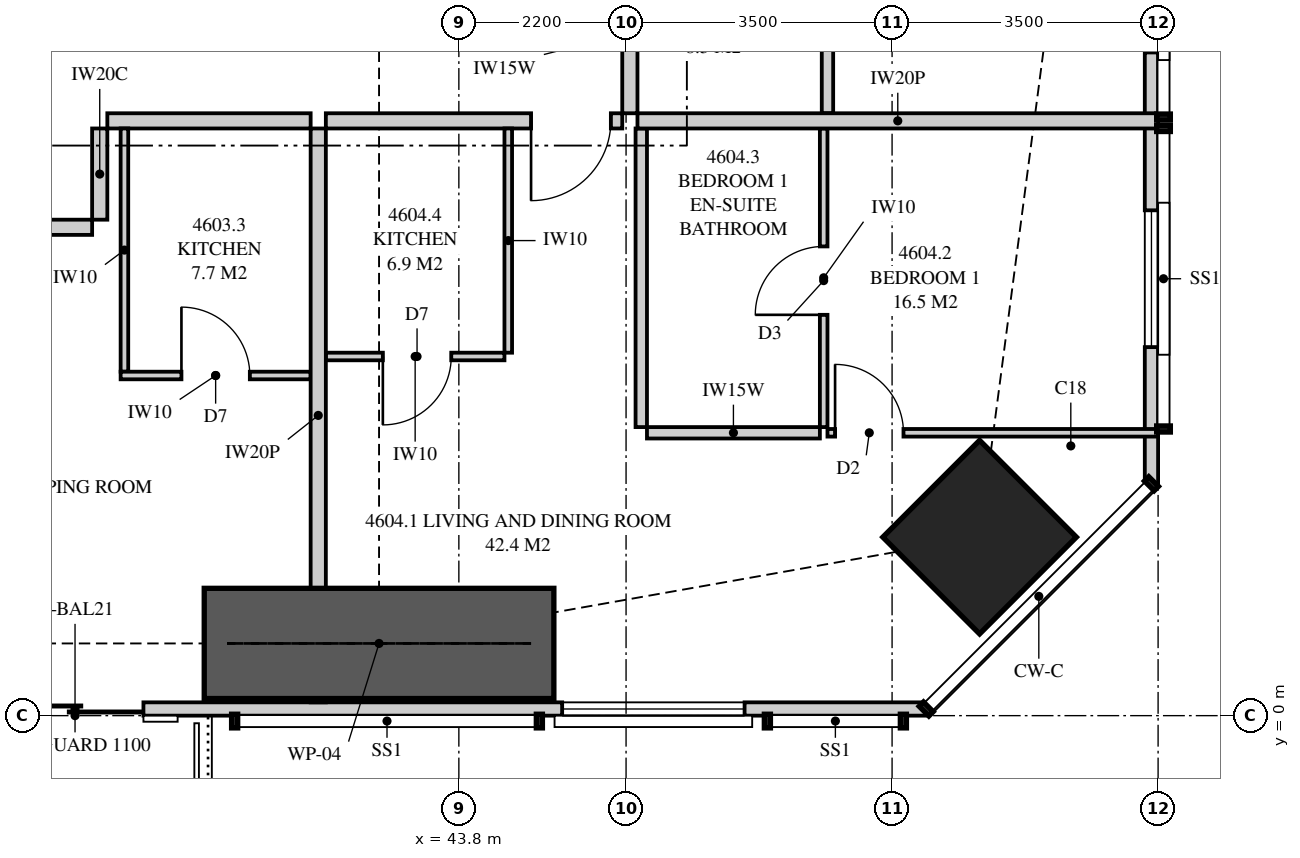
"""IFC4 building model, lengths in metres.
Left out: names, types, materials, properties, quantities, classifications, styles, units other than length and angle.
Written with IfcOpenShell. Run it as: python <this file> out.ifc"""

import sys

from ifc_helpers import new_model, si_unit, direction, frame, frame_2d, origin, origin_2d, place, context, subcontext, project, spatial, polyline, rectangle, outline, extrude, element, fill, save


model = new_model("IFC4")
c1 = context("Model", 3, precision=1e-05, world=origin(), true_north=direction((0.0, 1.0)))
c2 = subcontext(c1, "Body", "Model", "MODEL_VIEW")
j1 = project(units=[si_unit("LENGTHUNIT", "METRE"), si_unit("PLANEANGLEUNIT", "RADIAN")], contexts=[c1])
p1 = place(None, origin())
s1 = spatial("IfcSite", under=j1, at=p1, CompositionType="ELEMENT")
p2 = place(p1, origin())
s2 = spatial("IfcBuilding", under=s1, at=p2, CompositionType="ELEMENT")
p3 = place(p2, frame((0.0, 0.0, 171.1)))
s3 = spatial("IfcBuildingStorey", under=s2, at=p3, CompositionType="ELEMENT", Elevation=171.1)
p4 = place(p3, frame((50.652, 2.348, 0.0), z_axis=(0.0, 0.0, 1.0), x_axis=(0.707106781187, 0.707106781187, 0.0)))
e1 = element("IfcColumn", 1, at=p4, inside=s3, PredefinedType="COLUMN", context=c2, shape_type="SweptSolid", body=[
    extrude(rectangle(XDim=1.8, YDim=1.8, at=origin_2d()), origin(), (0.0, 0.0, 1.0), 3.35),
])
p5 = place(p3, frame((15.051, 0.087, 0.0), z_axis=(0.0, 0.0, 1.0), x_axis=(1.0, 0.0, 0.0)))
e2 = element("IfcWall", 2, at=p5, inside=s3, PredefinedType="SOLIDWALL", context=c2, shape_type="SweptSolid", body=[
    extrude(outline(polyline([(0.0, 0.0), (34.897, 0.0), (34.897, 3.11), (27.91, 3.11), (27.91, 2.15), (27.836, 2.15), (27.836, 3.11), (27.699, 3.11), (27.699, 2.15), (7.199, 2.15), (7.199, 3.11), (7.062, 3.11), (7.062, 2.15), (6.987, 2.15), (6.987, 3.11), (0.0, 3.11), (0.0, 0.0)])), frame((0.0, 0.087, 0.0), z_axis=(0.0, -1.0, 0.0), x_axis=(1.0, 0.0, 0.0)), (0.0, 0.0, 1.0), 0.175),
])
p6 = place(p5, frame((1.824, 0.0, 0.4)))
e3 = element("IfcOpeningElement", 3, at=p6, cuts=e2, PredefinedType="OPENING", context=c2, shape_type="SweptSolid", body=[
    extrude(rectangle(XDim=2.4, YDim=1.7, at=frame_2d((1.2, 0.85))), frame((0.0, 0.097, 0.0), z_axis=(0.0, -1.0, 0.0), x_axis=(1.0, 0.0, 0.0)), (0.0, 0.0, 1.0), 0.195),
])
p7 = place(p5, frame((10.399, 0.0, 0.0)))
e4 = element("IfcOpeningElement", 4, at=p7, cuts=e2, PredefinedType="OPENING", context=c2, shape_type="SweptSolid", body=[
    extrude(rectangle(XDim=1.8, YDim=2.1, at=frame_2d((0.9, 1.05))), frame((0.0, 0.097, 0.0), z_axis=(0.0, -1.0, 0.0), x_axis=(1.0, 0.0, 0.0)), (0.0, 0.0, 1.0), 0.195),
])
p8 = place(p5, frame((13.827, 0.0, 0.4)))
e5 = element("IfcOpeningElement", 5, at=p8, cuts=e2, PredefinedType="OPENING", context=c2, shape_type="SweptSolid", body=[
    extrude(rectangle(XDim=1.2, YDim=1.7, at=frame_2d((0.6, 0.85))), frame((0.0, 0.097, 0.0), z_axis=(0.0, -1.0, 0.0), x_axis=(1.0, 0.0, 0.0)), (0.0, 0.0, 1.0), 0.195),
])
p9 = place(p5, frame((22.799, 0.0, 0.0)))
e6 = element("IfcOpeningElement", 6, at=p9, cuts=e2, PredefinedType="OPENING", context=c2, shape_type="SweptSolid", body=[
    extrude(rectangle(XDim=1.8, YDim=2.1, at=frame_2d((0.9, 1.05))), frame((0.0, 0.097, 0.0), z_axis=(0.0, -1.0, 0.0), x_axis=(1.0, 0.0, 0.0)), (0.0, 0.0, 1.0), 0.195),
])
p10 = place(p5, frame((19.849, 0.0, 0.4)))
e7 = element("IfcOpeningElement", 7, at=p10, cuts=e2, PredefinedType="OPENING", context=c2, shape_type="SweptSolid", body=[
    extrude(rectangle(XDim=2.4, YDim=1.7, at=frame_2d((1.2, 0.85))), frame((0.0, 0.097, 0.0), z_axis=(0.0, -1.0, 0.0), x_axis=(1.0, 0.0, 0.0)), (0.0, 0.0, 1.0), 0.195),
])
p11 = place(p5, frame((30.108, 0.0, 0.4)))
e8 = element("IfcOpeningElement", 8, at=p11, cuts=e2, PredefinedType="OPENING", context=c2, shape_type="SweptSolid", body=[
    extrude(rectangle(XDim=2.4, YDim=1.7, at=frame_2d((1.2, 0.85))), frame((0.0, 0.097, 0.0), z_axis=(0.0, -1.0, 0.0), x_axis=(1.0, 0.0, 0.0)), (0.0, 0.0, 1.0), 0.195),
])
p12 = place(p3, frame((52.913, 3.051, 0.0), z_axis=(0.0, 0.0, 1.0), x_axis=(0.0, 1.0, 0.0)))
e9 = element("IfcWall", 9, at=p12, inside=s3, PredefinedType="SOLIDWALL", context=c2, shape_type="SweptSolid", body=[
    extrude(outline(polyline([(0.0, 0.0), (29.897, 0.0), (29.897, 3.11), (22.167, 3.11), (22.167, 2.15), (22.074, 2.15), (22.074, 3.11), (21.949, 3.11), (21.949, 2.15), (9.949, 2.15), (9.949, 3.11), (9.847, 3.11), (9.847, 2.15), (9.706, 2.15), (9.706, 3.11), (0.0, 3.11), (0.0, 0.0)])), frame((0.0, 0.087, 0.0), z_axis=(0.0, -1.0, 0.0), x_axis=(1.0, 0.0, 0.0)), (0.0, 0.0, 1.0), 0.175),
])
p13 = place(p12, frame((1.797, 0.0, 0.4)))
e10 = element("IfcOpeningElement", 10, at=p13, cuts=e9, PredefinedType="OPENING", context=c2, shape_type="SweptSolid", body=[
    extrude(rectangle(XDim=1.8, YDim=1.7, at=frame_2d((0.9, 0.85))), frame((0.0, 0.097, 0.0), z_axis=(0.0, -1.0, 0.0), x_axis=(1.0, 0.0, 0.0)), (0.0, 0.0, 1.0), 0.195),
])
p14 = place(p12, frame((5.674, 0.0, 0.4)))
e11 = element("IfcOpeningElement", 11, at=p14, cuts=e9, PredefinedType="OPENING", context=c2, shape_type="SweptSolid", body=[
    extrude(rectangle(XDim=1.8, YDim=1.7, at=frame_2d((0.9, 0.85))), frame((0.0, 0.097, 0.0), z_axis=(0.0, -1.0, 0.0), x_axis=(1.0, 0.0, 0.0)), (0.0, 0.0, 1.0), 0.195),
])
p15 = place(p12, frame((12.349, 0.0, 0.4)))
e12 = element("IfcOpeningElement", 12, at=p15, cuts=e9, PredefinedType="OPENING", context=c2, shape_type="SweptSolid", body=[
    extrude(rectangle(XDim=2.4, YDim=1.7, at=frame_2d((1.2, 0.85))), frame((0.0, 0.097, 0.0), z_axis=(0.0, -1.0, 0.0), x_axis=(1.0, 0.0, 0.0)), (0.0, 0.0, 1.0), 0.195),
])
p16 = place(p12, frame((15.274, 0.0, 0.0)))
e13 = element("IfcOpeningElement", 13, at=p16, cuts=e9, PredefinedType="OPENING", context=c2, shape_type="SweptSolid", body=[
    extrude(rectangle(XDim=1.8, YDim=2.1, at=frame_2d((0.9, 1.05))), frame((0.0, 0.097, 0.0), z_axis=(0.0, -1.0, 0.0), x_axis=(1.0, 0.0, 0.0)), (0.0, 0.0, 1.0), 0.195),
])
p17 = place(p12, frame((24.373, 0.0, 0.4)))
e14 = element("IfcOpeningElement", 14, at=p17, cuts=e9, PredefinedType="OPENING", context=c2, shape_type="SweptSolid", body=[
    extrude(rectangle(XDim=1.2, YDim=1.7, at=frame_2d((0.6, 0.85))), frame((0.0, 0.097, 0.0), z_axis=(0.0, -1.0, 0.0), x_axis=(1.0, 0.0, 0.0)), (0.0, 0.0, 1.0), 0.195),
])
p18 = place(p12, frame((26.801, 0.0, 0.4)))
e15 = element("IfcOpeningElement", 15, at=p18, cuts=e9, PredefinedType="OPENING", context=c2, shape_type="SweptSolid", body=[
    extrude(rectangle(XDim=1.8, YDim=1.7, at=frame_2d((0.9, 0.85))), frame((0.0, 0.097, 0.0), z_axis=(0.0, -1.0, 0.0), x_axis=(1.0, 0.0, 0.0)), (0.0, 0.0, 1.0), 0.195),
])
p19 = place(p3, frame((41.95, 0.175, 0.0), z_axis=(0.0, 0.0, 1.0), x_axis=(0.0, 1.0, 0.0)))
e16 = element("IfcWall", 16, at=p19, inside=s3, PredefinedType="PARTITIONING", context=c2, shape_type="SweptSolid", body=[
    extrude(outline(polyline([(0.529, 2.15), (0.0, 2.15), (0.0, 0.0), (0.529, 0.0), (0.529, 0.876), (1.021, 0.876), (1.021, 0.0), (7.55, 0.0), (7.55, 3.11), (1.685, 3.11), (1.685, 2.15), (1.021, 2.15), (1.021, 1.273), (0.529, 1.273), (0.529, 2.15)])), frame((0.0, 0.1, 0.0), z_axis=(0.0, -1.0, 0.0), x_axis=(1.0, 0.0, 0.0)), (0.0, 0.0, 1.0), 0.2),
])
p20 = place(p3, frame((42.05, 7.825, 0.0), z_axis=(0.0, 0.0, 1.0), x_axis=(1.0, 0.0, 0.0)))
e17 = element("IfcWall", 17, at=p20, inside=s3, PredefinedType="PARTITIONING", context=c2, shape_type="SweptSolid", body=[
    extrude(outline(polyline([(0.0, 0.0), (3.9, 0.0), (3.9, 3.11), (1.037, 3.11), (1.037, 2.541), (0.363, 2.541), (0.363, 3.11), (0.0, 3.11), (0.0, 0.0)])), frame((0.0, 0.1, 0.0), z_axis=(0.0, -1.0, 0.0), x_axis=(1.0, 0.0, 0.0)), (0.0, 0.0, 1.0), 0.2),
])
p21 = place(p20, frame((2.7, 0.0, 0.0)))
e18 = element("IfcOpeningElement", 18, at=p21, cuts=e17, PredefinedType="OPENING", context=c2, shape_type="SweptSolid", body=[
    extrude(rectangle(XDim=1.05, YDim=2.2, at=frame_2d((0.525, 1.1))), frame((0.0, 0.11, 0.0), z_axis=(0.0, -1.0, 0.0), x_axis=(1.0, 0.0, 0.0)), (0.0, 0.0, 1.0), 0.22),
])
p22 = place(p3, frame((48.6, 3.796, 0.0), z_axis=(0.0, 0.0, 1.0), x_axis=(0.0, 1.0, 0.0)))
e19 = element("IfcWall", 19, at=p22, inside=s3, PredefinedType="PARTITIONING", context=c2, shape_type="SweptSolid", body=[
    extrude(rectangle(XDim=3.929, YDim=0.1, at=frame_2d((1.964, 0.0))), origin(), (0.0, 0.0, 1.0), 3.11),
])
p23 = place(p22, frame((1.477, 0.0, 0.0)))
e20 = element("IfcOpeningElement", 20, at=p23, cuts=e19, PredefinedType="OPENING", context=c2, shape_type="SweptSolid", body=[
    extrude(rectangle(XDim=0.9, YDim=2.1, at=frame_2d((0.45, 1.05))), frame((0.0, 0.06, 0.0), z_axis=(0.0, -1.0, 0.0), x_axis=(1.0, 0.0, 0.0)), (0.0, 0.0, 1.0), 0.12),
])
p24 = place(p3, frame((48.65, 3.721, 0.0), z_axis=(0.0, 0.0, 1.0), x_axis=(1.0, 0.0, 0.0)))
e21 = element("IfcWall", 21, at=p24, inside=s3, PredefinedType="PARTITIONING", context=c2, shape_type="SweptSolid", body=[
    extrude(outline(polyline([(0.0, 0.0), (4.35, 0.0), (4.35, 3.11), (3.049, 3.11), (3.049, 2.15), (1.314, 2.15), (1.314, 3.11), (0.0, 3.11), (0.0, 0.0)])), frame((0.0, 0.05, 0.0), z_axis=(0.0, -1.0, 0.0), x_axis=(1.0, 0.0, 0.0)), (0.0, 0.0, 1.0), 0.1),
])
p25 = place(p24, frame((0.1, 0.0, 0.0)))
e22 = element("IfcOpeningElement", 22, at=p25, cuts=e21, PredefinedType="OPENING", context=c2, shape_type="SweptSolid", body=[
    extrude(rectangle(XDim=0.9, YDim=2.1, at=frame_2d((0.45, 1.05))), frame((0.0, 0.06, 0.0), z_axis=(0.0, -1.0, 0.0), x_axis=(1.0, 0.0, 0.0)), (0.0, 0.0, 1.0), 0.12),
])
p26 = place(p3, frame((46.275, 3.721, 0.0), z_axis=(0.0, 0.0, 1.0), x_axis=(1.0, 0.0, 0.0)))
e23 = element("IfcWall", 23, at=p26, inside=s3, PredefinedType="PLUMBINGWALL", context=c2, shape_type="SweptSolid", body=[
    extrude(rectangle(XDim=2.275, YDim=0.15, at=frame_2d((1.138, 0.0))), origin(), (0.0, 0.0, 1.0), 3.11),
])
p27 = place(p3, frame((46.2, 3.796, 0.0), z_axis=(0.0, 0.0, 1.0), x_axis=(0.0, 1.0, 0.0)))
e24 = element("IfcWall", 24, at=p27, inside=s3, PredefinedType="PLUMBINGWALL", context=c2, shape_type="SweptSolid", body=[
    extrude(rectangle(XDim=3.929, YDim=0.15, at=frame_2d((1.964, 0.0))), origin(), (0.0, 0.0, 1.0), 3.11),
])
p28 = place(p3, frame((42.05, 4.725, 0.0), z_axis=(0.0, 0.0, 1.0), x_axis=(1.0, 0.0, 0.0)))
e25 = element("IfcWall", 25, at=p28, inside=s3, PredefinedType="PARTITIONING", context=c2, shape_type="SweptSolid", body=[
    extrude(outline(polyline([(0.0, 0.0), (2.35, 0.0), (2.35, 3.11), (0.987, 3.11), (0.987, 2.541), (0.413, 2.541), (0.413, 3.11), (0.0, 3.11), (0.0, 0.0)])), frame((0.0, 0.05, 0.0), z_axis=(0.0, -1.0, 0.0), x_axis=(1.0, 0.0, 0.0)), (0.0, 0.0, 1.0), 0.1),
])
p29 = place(p28, frame((0.75, 0.0, 0.0)))
e26 = element("IfcOpeningElement", 26, at=p29, cuts=e25, PredefinedType="OPENING", context=c2, shape_type="SweptSolid", body=[
    extrude(rectangle(XDim=0.9, YDim=2.1, at=frame_2d((0.45, 1.05))), frame((0.0, 0.06, 0.0), z_axis=(0.0, -1.0, 0.0), x_axis=(1.0, 0.0, 0.0)), (0.0, 0.0, 1.0), 0.12),
])
p30 = place(p3, frame((44.45, 4.775, 0.0), z_axis=(0.0, 0.0, 1.0), x_axis=(0.0, 1.0, 0.0)))
e27 = element("IfcWall", 27, at=p30, inside=s3, PredefinedType="PARTITIONING", context=c2, shape_type="SweptSolid", body=[
    extrude(rectangle(XDim=2.95, YDim=0.1, at=frame_2d((1.475, 0.0))), origin(), (0.0, 0.0, 1.0), 3.11),
])
p31 = place(p3, frame((46.15, 7.825, 0.0), z_axis=(0.0, 0.0, 1.0), x_axis=(1.0, 0.0, 0.0)))
e28 = element("IfcWall", 28, at=p31, inside=s3, PredefinedType="PARTITIONING", context=c2, shape_type="SweptSolid", body=[
    extrude(outline(polyline([(0.0, 0.0), (6.85, 0.0), (6.85, 3.11), (6.138, 3.11), (6.138, 2.15), (4.303, 2.15), (4.303, 3.11), (0.0, 3.11), (0.0, 0.0)])), frame((0.0, 0.1, 0.0), z_axis=(0.0, -1.0, 0.0), x_axis=(1.0, 0.0, 0.0)), (0.0, 0.0, 1.0), 0.2),
])
p32 = place(p3, frame((46.05, 7.925, 0.0), z_axis=(0.0, 0.0, 1.0), x_axis=(0.0, 1.0, 0.0)))
e29 = element("IfcWall", 29, at=p32, inside=s3, PredefinedType="PARTITIONING", context=c2, shape_type="SweptSolid", body=[
    extrude(outline(polyline([(0.0, 0.0), (6.012, 0.0), (6.012, 3.11), (5.412, 3.11), (5.412, 2.541), (4.738, 2.541), (4.738, 3.11), (0.0, 3.11), (0.0, 0.0)])), frame((0.0, 0.1, 0.0), z_axis=(0.0, -1.0, 0.0), x_axis=(1.0, 0.0, 0.0)), (0.0, 0.0, 1.0), 0.2),
])
p33 = place(p3, frame((48.65, 7.925, 0.0), z_axis=(0.0, 0.0, 1.0), x_axis=(0.0, 1.0, 0.0)))
e30 = element("IfcWall", 30, at=p33, inside=s3, PredefinedType="PLUMBINGWALL", context=c2, shape_type="SweptSolid", body=[
    extrude(rectangle(XDim=3.45, YDim=0.15, at=frame_2d((1.725, 0.0))), origin(), (0.0, 0.0, 1.0), 3.11),
])
p34 = place(p33, frame((2.15, 0.0, 0.0)))
e31 = element("IfcOpeningElement", 31, at=p34, cuts=e30, PredefinedType="OPENING", context=c2, shape_type="SweptSolid", body=[
    extrude(rectangle(XDim=0.9, YDim=2.1, at=frame_2d((0.45, 1.05))), frame((0.0, 0.085, 0.0), z_axis=(0.0, -1.0, 0.0), x_axis=(1.0, 0.0, 0.0)), (0.0, 0.0, 1.0), 0.17),
])
p35 = place(p3, frame((39.175, 7.825, 0.0), z_axis=(0.0, 0.0, 1.0), x_axis=(1.0, 0.0, 0.0)))
e32 = element("IfcWall", 32, at=p35, inside=s3, PredefinedType="PARTITIONING", context=c2, shape_type="SweptSolid", body=[
    extrude(rectangle(XDim=2.675, YDim=0.2, at=frame_2d((1.337, 0.0))), origin(), (0.0, 0.0, 1.0), 3.11),
])
p36 = place(p3, frame((36.575, 6.425, 0.0), z_axis=(0.0, 0.0, 1.0), x_axis=(1.0, 0.0, 0.0)))
e33 = element("IfcWall", 33, at=p36, inside=s3, PredefinedType="PARTITIONING", context=c2, shape_type="SweptSolid", body=[
    extrude(rectangle(XDim=2.4, YDim=0.2, at=frame_2d((1.2, 0.0))), origin(), (0.0, 0.0, 1.0), 3.11),
])
p37 = place(p36, frame((0.7, 0.0, 0.0)))
e34 = element("IfcOpeningElement", 34, at=p37, cuts=e33, PredefinedType="OPENING", context=c2, shape_type="SweptSolid", body=[
    extrude(rectangle(XDim=1.05, YDim=2.2, at=frame_2d((0.525, 1.1))), frame((0.0, 0.11, 0.0), z_axis=(0.0, -1.0, 0.0), x_axis=(1.0, 0.0, 0.0)), (0.0, 0.0, 1.0), 0.22),
])
p38 = place(p3, frame((39.075, 7.725, 0.0), z_axis=(0.0, 0.0, 1.0), x_axis=(0.0, -1.0, 0.0)))
e35 = element("IfcWall", 35, at=p38, inside=s3, PredefinedType="PARTITIONING", context=c2, shape_type="SweptSolid", body=[
    extrude(rectangle(XDim=1.2, YDim=0.2, at=frame_2d((0.6, 0.0))), origin(), (0.0, 0.0, 1.0), 3.11),
])
p39 = place(p3, frame((41.85, 4.475, 0.0), z_axis=(0.0, 0.0, 1.0), x_axis=(-1.0, 0.0, 0.0)))
e36 = element("IfcWall", 36, at=p39, inside=s3, PredefinedType="PARTITIONING", context=c2, shape_type="SweptSolid", body=[
    extrude(rectangle(XDim=2.5, YDim=0.1, at=frame_2d((1.25, 0.0))), origin(), (0.0, 0.0, 1.0), 3.11),
])
p40 = place(p39, frame((0.8, 0.0, 0.0)))
e37 = element("IfcOpeningElement", 37, at=p40, cuts=e36, PredefinedType="OPENING", context=c2, shape_type="SweptSolid", body=[
    extrude(rectangle(XDim=0.9, YDim=2.1, at=frame_2d((0.45, 1.05))), frame((0.0, 0.06, 0.0), z_axis=(0.0, -1.0, 0.0), x_axis=(1.0, 0.0, 0.0)), (0.0, 0.0, 1.0), 0.12),
])
p41 = place(p3, frame((39.4, 7.725, 0.0), z_axis=(0.0, 0.0, 1.0), x_axis=(0.0, -1.0, 0.0)))
e38 = element("IfcWall", 38, at=p41, inside=s3, PredefinedType="PARTITIONING", context=c2, shape_type="SweptSolid", body=[
    extrude(rectangle(XDim=3.2, YDim=0.1, at=frame_2d((1.6, 0.0))), origin(), (0.0, 0.0, 1.0), 3.11),
])
p42 = place(p3, frame((40.45, 0.95, 0.0), z_axis=(0.0, 0.0, 1.0), x_axis=(1.0, 0.0, 0.0)))
e39 = element("IfcWall", 39, at=p42, inside=s3, PredefinedType="SHEAR", context=c2, shape_type="SweptSolid", body=[
    extrude(rectangle(XDim=4.6, YDim=1.45, at=frame_2d((2.3, 0.0))), origin(), (0.0, 0.0, 1.0), 3.35),
])
p43 = place(p9, origin())
e40 = element("IfcDoor", 40, at=p43, inside=s3, OperationType="SLIDING_TO_LEFT", PredefinedType="DOOR", context=c2, shape_type="SweptSolid", body=[
    extrude(rectangle(XDim=1.8, YDim=2.1, at=frame_2d((0.9, 1.05))), frame((0.0, 0.025, 0.0), z_axis=(0.0, -1.0, 0.0), x_axis=(1.0, 0.0, 0.0)), (0.0, 0.0, 1.0), 0.05),
])
fill(e6, e40)
p44 = place(p11, origin())
e41 = element("IfcWindow", 41, at=p44, inside=s3, PartitioningType="SINGLE_PANEL", PredefinedType="WINDOW", context=c2, shape_type="SweptSolid", body=[
    extrude(rectangle(XDim=2.4, YDim=1.7, at=frame_2d((1.2, 0.85))), frame((0.0, 0.03, 0.0), z_axis=(0.0, -1.0, 0.0), x_axis=(1.0, 0.0, 0.0)), (0.0, 0.0, 1.0), 0.06),
])
fill(e8, e41)
p45 = place(p13, origin())
e42 = element("IfcWindow", 42, at=p45, inside=s3, PartitioningType="SINGLE_PANEL", PredefinedType="WINDOW", context=c2, shape_type="SweptSolid", body=[
    extrude(rectangle(XDim=1.8, YDim=1.7, at=frame_2d((0.9, 0.85))), frame((0.0, 0.03, 0.0), z_axis=(0.0, -1.0, 0.0), x_axis=(1.0, 0.0, 0.0)), (0.0, 0.0, 1.0), 0.06),
])
fill(e10, e42)
p46 = place(p14, origin())
e43 = element("IfcWindow", 43, at=p46, inside=s3, PartitioningType="SINGLE_PANEL", PredefinedType="WINDOW", context=c2, shape_type="SweptSolid", body=[
    extrude(rectangle(XDim=1.8, YDim=1.7, at=frame_2d((0.9, 0.85))), frame((0.0, 0.03, 0.0), z_axis=(0.0, -1.0, 0.0), x_axis=(1.0, 0.0, 0.0)), (0.0, 0.0, 1.0), 0.06),
])
fill(e11, e43)
p47 = place(p21, frame((1.05, 0.0, 0.0), z_axis=(0.0, 0.0, 1.0), x_axis=(-1.0, 0.0, 0.0)))
e44 = element("IfcDoor", 44, at=p47, inside=s3, OperationType="SINGLE_SWING_RIGHT", PredefinedType="DOOR", context=c2, shape_type="SweptSolid", body=[
    extrude(rectangle(XDim=1.05, YDim=2.2, at=frame_2d((0.525, 1.1))), frame((0.0, 0.025, 0.0), z_axis=(0.0, -1.0, 0.0), x_axis=(1.0, 0.0, 0.0)), (0.0, 0.0, 1.0), 0.05),
])
fill(e18, e44)
p48 = place(p25, origin())
e45 = element("IfcDoor", 45, at=p48, inside=s3, OperationType="SINGLE_SWING_LEFT", PredefinedType="DOOR", context=c2, shape_type="SweptSolid", body=[
    extrude(rectangle(XDim=0.9, YDim=2.1, at=frame_2d((0.45, 1.05))), frame((0.0, 0.025, 0.0), z_axis=(0.0, -1.0, 0.0), x_axis=(1.0, 0.0, 0.0)), (0.0, 0.0, 1.0), 0.05),
])
fill(e22, e45)
p49 = place(p23, origin())
e46 = element("IfcDoor", 46, at=p49, inside=s3, OperationType="SINGLE_SWING_LEFT", PredefinedType="DOOR", context=c2, shape_type="SweptSolid", body=[
    extrude(rectangle(XDim=0.9, YDim=2.1, at=frame_2d((0.45, 1.05))), frame((0.0, 0.025, 0.0), z_axis=(0.0, -1.0, 0.0), x_axis=(1.0, 0.0, 0.0)), (0.0, 0.0, 1.0), 0.05),
])
fill(e20, e46)
p50 = place(p29, frame((0.9, 0.0, 0.0), z_axis=(0.0, 0.0, 1.0), x_axis=(-1.0, 0.0, 0.0)))
e47 = element("IfcDoor", 47, at=p50, inside=s3, OperationType="SINGLE_SWING_RIGHT", PredefinedType="DOOR", context=c2, shape_type="SweptSolid", body=[
    extrude(rectangle(XDim=0.9, YDim=2.1, at=frame_2d((0.45, 1.05))), frame((0.0, 0.025, 0.0), z_axis=(0.0, -1.0, 0.0), x_axis=(1.0, 0.0, 0.0)), (0.0, 0.0, 1.0), 0.05),
])
fill(e26, e47)
p51 = place(p40, frame((0.9, 0.0, 0.0), z_axis=(0.0, 0.0, 1.0), x_axis=(-1.0, 0.0, 0.0)))
e48 = element("IfcDoor", 48, at=p51, inside=s3, OperationType="SINGLE_SWING_LEFT", PredefinedType="DOOR", context=c2, shape_type="SweptSolid", body=[
    extrude(rectangle(XDim=0.9, YDim=2.1, at=frame_2d((0.45, 1.05))), frame((0.0, 0.025, 0.0), z_axis=(0.0, -1.0, 0.0), x_axis=(1.0, 0.0, 0.0)), (0.0, 0.0, 1.0), 0.05),
])
fill(e37, e48)
save(model, sys.argv[1])
